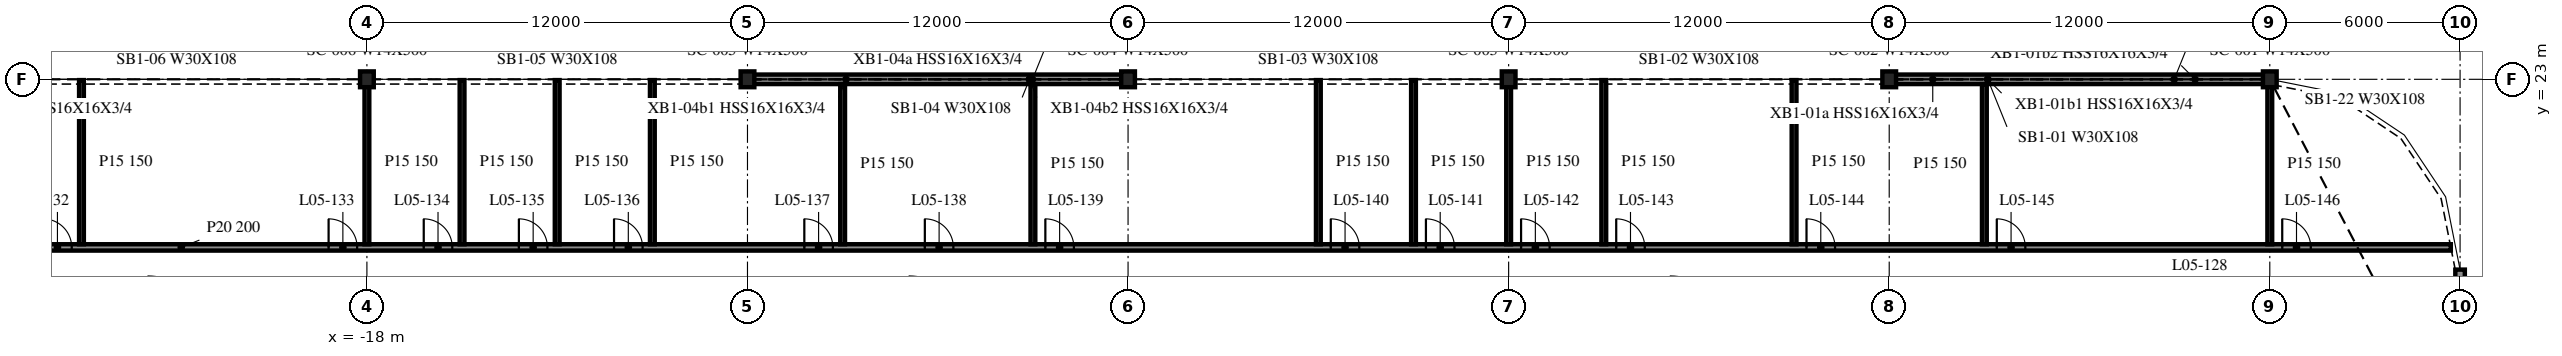
"""IFC4 building model, lengths in metres.
Left out: names, types, materials, properties, quantities, classifications, styles, units other than length and angle.
Written with IfcOpenShell. Run it as: python <this file> out.ifc"""

import sys

from ifc_helpers import new_model, si_unit, direction, frame, frame_2d, origin, origin_2d, place, context, subcontext, project, spatial, rectangle, i_section, extrude, element, fill, save


model = new_model("IFC4")
c1 = context("Model", 3, precision=1e-05, world=origin(), true_north=direction((0.0, 1.0)))
c2 = subcontext(c1, "Body", "Model", "MODEL_VIEW")
j1 = project(units=[si_unit("LENGTHUNIT", "METRE"), si_unit("PLANEANGLEUNIT", "RADIAN")], contexts=[c1])
p1 = place(None, origin())
s1 = spatial("IfcSite", under=j1, at=p1, CompositionType="ELEMENT")
p2 = place(p1, origin())
s2 = spatial("IfcBuilding", under=s1, at=p2, CompositionType="ELEMENT")
p3 = place(p2, frame((0.0, 0.0, 24.4)))
s3 = spatial("IfcBuildingStorey", under=s2, at=p3, CompositionType="ELEMENT", Elevation=24.4)
for number, where, z_axis, x_axis in (
    (1, (42.0, 23.0, -0.34), (0.0, 0.0, 1.0), (1.0, 0.0, 0.0)),
    (2, (30.0, 23.0, -0.34), (0.0, 0.0, 1.0), (1.0, 0.0, 0.0)),
    (3, (18.0, 23.0, -0.34), (0.0, 0.0, 1.0), (1.0, 0.0, 0.0)),
    (4, (6.0, 23.0, -0.34), (0.0, 0.0, 1.0), (1.0, 0.0, 0.0)),
    (5, (-6.0, 23.0, -0.34), (0.0, 0.0, 1.0), (1.0, 0.0, 0.0)),
    (6, (-18.0, 23.0, -0.34), (0.0, 0.0, 1.0), (1.0, 0.0, 0.0)),
):
    element("IfcColumn", number, at=place(p3, frame(where, z_axis=z_axis, x_axis=x_axis)), inside=s3, PredefinedType="COLUMN", context=c2, shape_type="SweptSolid", body=[
        extrude(i_section(OverallWidth=0.432, OverallDepth=0.498, WebThickness=0.056, FlangeThickness=0.089, at=origin_2d()), origin(), (0.0, 0.0, 1.0), 4.3),
    ])
for number, where, z_axis, x_axis in (
    (7, (41.972, 23.0, 0.0), (0.0, 0.0, 1.0), (-1.0, 0.0, 0.0)),
    (8, (5.972, 23.0, 0.0), (0.0, 0.0, 1.0), (-1.0, 0.0, 0.0)),
):
    element("IfcWall", number, at=place(p3, frame(where, z_axis=z_axis, x_axis=x_axis)), inside=s3, PredefinedType="NOTDEFINED", context=c2, shape_type="SweptSolid", body=[
        extrude(rectangle(XDim=11.944, YDim=0.3, at=frame_2d((5.972, 0.0))), origin(), (0.0, 0.0, 1.0), 3.203),
    ])
p4 = place(p3, frame((48.0, 11.749, 0.0), z_axis=(0.0, 0.0, 1.0), x_axis=(0.0, 1.0, 0.0)))
e9 = element("IfcWall", 9, at=p4, inside=s3, PredefinedType="NOTDEFINED", context=c2, shape_type="SweptSolid", body=[
    extrude(rectangle(XDim=5.251, YDim=0.3, at=frame_2d((2.625, 0.0))), origin(), (0.0, 0.0, 1.0), 3.203),
])
p5 = place(p3, frame((-47.708, 17.7, 0.0), z_axis=(0.0, 0.0, 1.0), x_axis=(1.0, 0.0, 0.0)))
e10 = element("IfcWall", 10, at=p5, inside=s3, PredefinedType="PARTITIONING", context=c2, shape_type="SweptSolid", body=[
    extrude(rectangle(XDim=95.416, YDim=0.2, at=frame_2d((47.708, 0.0))), origin(), (0.0, 0.0, 1.0), 3.96),
])
p6 = place(p5, frame((4.5, 0.0, 0.0)))
e11 = element("IfcOpeningElement", 11, at=p6, cuts=e10, PredefinedType="OPENING", context=c2, shape_type="SweptSolid", body=[
    extrude(rectangle(XDim=0.9, YDim=2.1, at=frame_2d((0.45, 1.05))), frame((0.0, 0.11, 0.0), z_axis=(0.0, -1.0, 0.0), x_axis=(1.0, 0.0, 0.0)), (0.0, 0.0, 1.0), 0.22),
])
p7 = place(p5, frame((7.5, 0.0, 0.0)))
e12 = element("IfcOpeningElement", 12, at=p7, cuts=e10, PredefinedType="OPENING", context=c2, shape_type="SweptSolid", body=[
    extrude(rectangle(XDim=0.9, YDim=2.1, at=frame_2d((0.45, 1.05))), frame((0.0, 0.11, 0.0), z_axis=(0.0, -1.0, 0.0), x_axis=(1.0, 0.0, 0.0)), (0.0, 0.0, 1.0), 0.22),
])
p8 = place(p5, frame((13.5, 0.0, 0.0)))
e13 = element("IfcOpeningElement", 13, at=p8, cuts=e10, PredefinedType="OPENING", context=c2, shape_type="SweptSolid", body=[
    extrude(rectangle(XDim=0.9, YDim=2.1, at=frame_2d((0.45, 1.05))), frame((0.0, 0.11, 0.0), z_axis=(0.0, -1.0, 0.0), x_axis=(1.0, 0.0, 0.0)), (0.0, 0.0, 1.0), 0.22),
])
p9 = place(p5, frame((19.5, 0.0, 0.0)))
e14 = element("IfcOpeningElement", 14, at=p9, cuts=e10, PredefinedType="OPENING", context=c2, shape_type="SweptSolid", body=[
    extrude(rectangle(XDim=0.9, YDim=2.1, at=frame_2d((0.45, 1.05))), frame((0.0, 0.11, 0.0), z_axis=(0.0, -1.0, 0.0), x_axis=(1.0, 0.0, 0.0)), (0.0, 0.0, 1.0), 0.22),
])
p10 = place(p5, frame((28.5, 0.0, 0.0)))
e15 = element("IfcOpeningElement", 15, at=p10, cuts=e10, PredefinedType="OPENING", context=c2, shape_type="SweptSolid", body=[
    extrude(rectangle(XDim=0.9, YDim=2.1, at=frame_2d((0.45, 1.05))), frame((0.0, 0.11, 0.0), z_axis=(0.0, -1.0, 0.0), x_axis=(1.0, 0.0, 0.0)), (0.0, 0.0, 1.0), 0.22),
])
p11 = place(p5, frame((31.5, 0.0, 0.0)))
e16 = element("IfcOpeningElement", 16, at=p11, cuts=e10, PredefinedType="OPENING", context=c2, shape_type="SweptSolid", body=[
    extrude(rectangle(XDim=0.9, YDim=2.1, at=frame_2d((0.45, 1.05))), frame((0.0, 0.11, 0.0), z_axis=(0.0, -1.0, 0.0), x_axis=(1.0, 0.0, 0.0)), (0.0, 0.0, 1.0), 0.22),
])
p12 = place(p5, frame((34.5, 0.0, 0.0)))
e17 = element("IfcOpeningElement", 17, at=p12, cuts=e10, PredefinedType="OPENING", context=c2, shape_type="SweptSolid", body=[
    extrude(rectangle(XDim=0.9, YDim=2.1, at=frame_2d((0.45, 1.05))), frame((0.0, 0.11, 0.0), z_axis=(0.0, -1.0, 0.0), x_axis=(1.0, 0.0, 0.0)), (0.0, 0.0, 1.0), 0.22),
])
p13 = place(p5, frame((37.5, 0.0, 0.0)))
e18 = element("IfcOpeningElement", 18, at=p13, cuts=e10, PredefinedType="OPENING", context=c2, shape_type="SweptSolid", body=[
    extrude(rectangle(XDim=0.9, YDim=2.1, at=frame_2d((0.45, 1.05))), frame((0.0, 0.11, 0.0), z_axis=(0.0, -1.0, 0.0), x_axis=(1.0, 0.0, 0.0)), (0.0, 0.0, 1.0), 0.22),
])
p14 = place(p5, frame((43.5, 0.0, 0.0)))
e19 = element("IfcOpeningElement", 19, at=p14, cuts=e10, PredefinedType="OPENING", context=c2, shape_type="SweptSolid", body=[
    extrude(rectangle(XDim=0.9, YDim=2.1, at=frame_2d((0.45, 1.05))), frame((0.0, 0.11, 0.0), z_axis=(0.0, -1.0, 0.0), x_axis=(1.0, 0.0, 0.0)), (0.0, 0.0, 1.0), 0.22),
])
p15 = place(p5, frame((47.3, 0.0, 0.0)))
e20 = element("IfcOpeningElement", 20, at=p15, cuts=e10, PredefinedType="OPENING", context=c2, shape_type="SweptSolid", body=[
    extrude(rectangle(XDim=0.9, YDim=2.1, at=frame_2d((0.45, 1.05))), frame((0.0, 0.11, 0.0), z_axis=(0.0, -1.0, 0.0), x_axis=(1.0, 0.0, 0.0)), (0.0, 0.0, 1.0), 0.22),
])
p16 = place(p5, frame((51.1, 0.0, 0.0)))
e21 = element("IfcOpeningElement", 21, at=p16, cuts=e10, PredefinedType="OPENING", context=c2, shape_type="SweptSolid", body=[
    extrude(rectangle(XDim=0.9, YDim=2.1, at=frame_2d((0.45, 1.05))), frame((0.0, 0.11, 0.0), z_axis=(0.0, -1.0, 0.0), x_axis=(1.0, 0.0, 0.0)), (0.0, 0.0, 1.0), 0.22),
])
p17 = place(p5, frame((60.1, 0.0, 0.0)))
e22 = element("IfcOpeningElement", 22, at=p17, cuts=e10, PredefinedType="OPENING", context=c2, shape_type="SweptSolid", body=[
    extrude(rectangle(XDim=0.9, YDim=2.1, at=frame_2d((0.45, 1.05))), frame((0.0, 0.11, 0.0), z_axis=(0.0, -1.0, 0.0), x_axis=(1.0, 0.0, 0.0)), (0.0, 0.0, 1.0), 0.22),
])
p18 = place(p5, frame((63.1, 0.0, 0.0)))
e23 = element("IfcOpeningElement", 23, at=p18, cuts=e10, PredefinedType="OPENING", context=c2, shape_type="SweptSolid", body=[
    extrude(rectangle(XDim=0.9, YDim=2.1, at=frame_2d((0.45, 1.05))), frame((0.0, 0.11, 0.0), z_axis=(0.0, -1.0, 0.0), x_axis=(1.0, 0.0, 0.0)), (0.0, 0.0, 1.0), 0.22),
])
p19 = place(p5, frame((66.1, 0.0, 0.0)))
e24 = element("IfcOpeningElement", 24, at=p19, cuts=e10, PredefinedType="OPENING", context=c2, shape_type="SweptSolid", body=[
    extrude(rectangle(XDim=0.9, YDim=2.1, at=frame_2d((0.45, 1.05))), frame((0.0, 0.11, 0.0), z_axis=(0.0, -1.0, 0.0), x_axis=(1.0, 0.0, 0.0)), (0.0, 0.0, 1.0), 0.22),
])
p20 = place(p5, frame((69.1, 0.0, 0.0)))
e25 = element("IfcOpeningElement", 25, at=p20, cuts=e10, PredefinedType="OPENING", context=c2, shape_type="SweptSolid", body=[
    extrude(rectangle(XDim=0.9, YDim=2.1, at=frame_2d((0.45, 1.05))), frame((0.0, 0.11, 0.0), z_axis=(0.0, -1.0, 0.0), x_axis=(1.0, 0.0, 0.0)), (0.0, 0.0, 1.0), 0.22),
])
p21 = place(p5, frame((75.1, 0.0, 0.0)))
e26 = element("IfcOpeningElement", 26, at=p21, cuts=e10, PredefinedType="OPENING", context=c2, shape_type="SweptSolid", body=[
    extrude(rectangle(XDim=0.9, YDim=2.1, at=frame_2d((0.45, 1.05))), frame((0.0, 0.11, 0.0), z_axis=(0.0, -1.0, 0.0), x_axis=(1.0, 0.0, 0.0)), (0.0, 0.0, 1.0), 0.22),
])
p22 = place(p5, frame((81.1, 0.0, 0.0)))
e27 = element("IfcOpeningElement", 27, at=p22, cuts=e10, PredefinedType="OPENING", context=c2, shape_type="SweptSolid", body=[
    extrude(rectangle(XDim=0.9, YDim=2.1, at=frame_2d((0.45, 1.05))), frame((0.0, 0.11, 0.0), z_axis=(0.0, -1.0, 0.0), x_axis=(1.0, 0.0, 0.0)), (0.0, 0.0, 1.0), 0.22),
])
p23 = place(p5, frame((90.1, 0.0, 0.0)))
e28 = element("IfcOpeningElement", 28, at=p23, cuts=e10, PredefinedType="OPENING", context=c2, shape_type="SweptSolid", body=[
    extrude(rectangle(XDim=0.9, YDim=2.1, at=frame_2d((0.45, 1.05))), frame((0.0, 0.11, 0.0), z_axis=(0.0, -1.0, 0.0), x_axis=(1.0, 0.0, 0.0)), (0.0, 0.0, 1.0), 0.22),
])
for number, where, z_axis, x_axis in (
    (29, (-27.0, 17.8, 0.0), (0.0, 0.0, 1.0), (0.0, 1.0, 0.0)),
    (30, (-18.0, 17.8, 0.0), (0.0, 0.0, 1.0), (0.0, 1.0, 0.0)),
    (31, (-15.0, 17.8, 0.0), (0.0, 0.0, 1.0), (0.0, 1.0, 0.0)),
    (32, (-12.0, 17.8, 0.0), (0.0, 0.0, 1.0), (0.0, 1.0, 0.0)),
    (33, (-9.0, 17.8, 0.0), (0.0, 0.0, 1.0), (0.0, 1.0, 0.0)),
):
    element("IfcWall", number, at=place(p3, frame(where, z_axis=z_axis, x_axis=x_axis)), inside=s3, PredefinedType="PARTITIONING", context=c2, shape_type="SweptSolid", body=[
        extrude(rectangle(XDim=5.175, YDim=0.15, at=frame_2d((2.587, 0.0))), origin(), (0.0, 0.0, 1.0), 3.96),
    ])
for number, where, z_axis, x_axis in (
    (34, (-3.0, 17.8, 0.0), (0.0, 0.0, 1.0), (0.0, 1.0, 0.0)),
    (35, (3.0, 17.8, 0.0), (0.0, 0.0, 1.0), (0.0, 1.0, 0.0)),
):
    element("IfcWall", number, at=place(p3, frame(where, z_axis=z_axis, x_axis=x_axis)), inside=s3, PredefinedType="PARTITIONING", context=c2, shape_type="SweptSolid", body=[
        extrude(rectangle(XDim=5.05, YDim=0.15, at=frame_2d((2.525, 0.0))), origin(), (0.0, 0.0, 1.0), 3.96),
    ])
for number, where, z_axis, x_axis in (
    (36, (12.0, 17.8, 0.0), (0.0, 0.0, 1.0), (0.0, 1.0, 0.0)),
    (37, (15.0, 17.8, 0.0), (0.0, 0.0, 1.0), (0.0, 1.0, 0.0)),
    (38, (18.0, 17.8, 0.0), (0.0, 0.0, 1.0), (0.0, 1.0, 0.0)),
    (39, (21.0, 17.8, 0.0), (0.0, 0.0, 1.0), (0.0, 1.0, 0.0)),
    (40, (27.0, 17.8, 0.0), (0.0, 0.0, 1.0), (0.0, 1.0, 0.0)),
):
    element("IfcWall", number, at=place(p3, frame(where, z_axis=z_axis, x_axis=x_axis)), inside=s3, PredefinedType="PARTITIONING", context=c2, shape_type="SweptSolid", body=[
        extrude(rectangle(XDim=5.175, YDim=0.15, at=frame_2d((2.587, 0.0))), origin(), (0.0, 0.0, 1.0), 3.96),
    ])
p24 = place(p3, frame((33.0, 17.8, 0.0), z_axis=(0.0, 0.0, 1.0), x_axis=(0.0, 1.0, 0.0)))
e41 = element("IfcWall", 41, at=p24, inside=s3, PredefinedType="PARTITIONING", context=c2, shape_type="SweptSolid", body=[
    extrude(rectangle(XDim=5.05, YDim=0.15, at=frame_2d((2.525, 0.0))), origin(), (0.0, 0.0, 1.0), 3.96),
])
p25 = place(p3, frame((42.0, 17.8, 0.0), z_axis=(0.0, 0.0, 1.0), x_axis=(0.0, 1.0, 0.0)))
e42 = element("IfcWall", 42, at=p25, inside=s3, PredefinedType="PARTITIONING", context=c2, shape_type="SweptSolid", body=[
    extrude(rectangle(XDim=5.047, YDim=0.15, at=frame_2d((2.523, 0.0))), origin(), (0.0, 0.0, 1.0), 3.96),
])
p26 = place(p9, origin())
e43 = element("IfcDoor", 43, at=p26, inside=s3, OperationType="SINGLE_SWING_LEFT", PredefinedType="DOOR", context=c2, shape_type="SweptSolid", body=[
    extrude(rectangle(XDim=0.9, YDim=2.1, at=frame_2d((0.45, 1.05))), frame((0.0, 0.025, 0.0), z_axis=(0.0, -1.0, 0.0), x_axis=(1.0, 0.0, 0.0)), (0.0, 0.0, 1.0), 0.05),
])
fill(e14, e43)
p27 = place(p10, origin())
e44 = element("IfcDoor", 44, at=p27, inside=s3, OperationType="SINGLE_SWING_LEFT", PredefinedType="DOOR", context=c2, shape_type="SweptSolid", body=[
    extrude(rectangle(XDim=0.9, YDim=2.1, at=frame_2d((0.45, 1.05))), frame((0.0, 0.025, 0.0), z_axis=(0.0, -1.0, 0.0), x_axis=(1.0, 0.0, 0.0)), (0.0, 0.0, 1.0), 0.05),
])
fill(e15, e44)
p28 = place(p11, origin())
e45 = element("IfcDoor", 45, at=p28, inside=s3, OperationType="SINGLE_SWING_LEFT", PredefinedType="DOOR", context=c2, shape_type="SweptSolid", body=[
    extrude(rectangle(XDim=0.9, YDim=2.1, at=frame_2d((0.45, 1.05))), frame((0.0, 0.025, 0.0), z_axis=(0.0, -1.0, 0.0), x_axis=(1.0, 0.0, 0.0)), (0.0, 0.0, 1.0), 0.05),
])
fill(e16, e45)
p29 = place(p12, origin())
e46 = element("IfcDoor", 46, at=p29, inside=s3, OperationType="SINGLE_SWING_LEFT", PredefinedType="DOOR", context=c2, shape_type="SweptSolid", body=[
    extrude(rectangle(XDim=0.9, YDim=2.1, at=frame_2d((0.45, 1.05))), frame((0.0, 0.025, 0.0), z_axis=(0.0, -1.0, 0.0), x_axis=(1.0, 0.0, 0.0)), (0.0, 0.0, 1.0), 0.05),
])
fill(e17, e46)
p30 = place(p13, origin())
e47 = element("IfcDoor", 47, at=p30, inside=s3, OperationType="SINGLE_SWING_LEFT", PredefinedType="DOOR", context=c2, shape_type="SweptSolid", body=[
    extrude(rectangle(XDim=0.9, YDim=2.1, at=frame_2d((0.45, 1.05))), frame((0.0, 0.025, 0.0), z_axis=(0.0, -1.0, 0.0), x_axis=(1.0, 0.0, 0.0)), (0.0, 0.0, 1.0), 0.05),
])
fill(e18, e47)
p31 = place(p14, origin())
e48 = element("IfcDoor", 48, at=p31, inside=s3, OperationType="SINGLE_SWING_LEFT", PredefinedType="DOOR", context=c2, shape_type="SweptSolid", body=[
    extrude(rectangle(XDim=0.9, YDim=2.1, at=frame_2d((0.45, 1.05))), frame((0.0, 0.025, 0.0), z_axis=(0.0, -1.0, 0.0), x_axis=(1.0, 0.0, 0.0)), (0.0, 0.0, 1.0), 0.05),
])
fill(e19, e48)
p32 = place(p15, origin())
e49 = element("IfcDoor", 49, at=p32, inside=s3, OperationType="SINGLE_SWING_RIGHT", PredefinedType="DOOR", context=c2, shape_type="SweptSolid", body=[
    extrude(rectangle(XDim=0.9, YDim=2.1, at=frame_2d((0.45, 1.05))), frame((0.0, 0.025, 0.0), z_axis=(0.0, -1.0, 0.0), x_axis=(1.0, 0.0, 0.0)), (0.0, 0.0, 1.0), 0.05),
])
fill(e20, e49)
p33 = place(p16, origin())
e50 = element("IfcDoor", 50, at=p33, inside=s3, OperationType="SINGLE_SWING_RIGHT", PredefinedType="DOOR", context=c2, shape_type="SweptSolid", body=[
    extrude(rectangle(XDim=0.9, YDim=2.1, at=frame_2d((0.45, 1.05))), frame((0.0, 0.025, 0.0), z_axis=(0.0, -1.0, 0.0), x_axis=(1.0, 0.0, 0.0)), (0.0, 0.0, 1.0), 0.05),
])
fill(e21, e50)
p34 = place(p17, origin())
e51 = element("IfcDoor", 51, at=p34, inside=s3, OperationType="SINGLE_SWING_RIGHT", PredefinedType="DOOR", context=c2, shape_type="SweptSolid", body=[
    extrude(rectangle(XDim=0.9, YDim=2.1, at=frame_2d((0.45, 1.05))), frame((0.0, 0.025, 0.0), z_axis=(0.0, -1.0, 0.0), x_axis=(1.0, 0.0, 0.0)), (0.0, 0.0, 1.0), 0.05),
])
fill(e22, e51)
p35 = place(p18, origin())
e52 = element("IfcDoor", 52, at=p35, inside=s3, OperationType="SINGLE_SWING_RIGHT", PredefinedType="DOOR", context=c2, shape_type="SweptSolid", body=[
    extrude(rectangle(XDim=0.9, YDim=2.1, at=frame_2d((0.45, 1.05))), frame((0.0, 0.025, 0.0), z_axis=(0.0, -1.0, 0.0), x_axis=(1.0, 0.0, 0.0)), (0.0, 0.0, 1.0), 0.05),
])
fill(e23, e52)
p36 = place(p19, origin())
e53 = element("IfcDoor", 53, at=p36, inside=s3, OperationType="SINGLE_SWING_RIGHT", PredefinedType="DOOR", context=c2, shape_type="SweptSolid", body=[
    extrude(rectangle(XDim=0.9, YDim=2.1, at=frame_2d((0.45, 1.05))), frame((0.0, 0.025, 0.0), z_axis=(0.0, -1.0, 0.0), x_axis=(1.0, 0.0, 0.0)), (0.0, 0.0, 1.0), 0.05),
])
fill(e24, e53)
p37 = place(p20, origin())
e54 = element("IfcDoor", 54, at=p37, inside=s3, OperationType="SINGLE_SWING_RIGHT", PredefinedType="DOOR", context=c2, shape_type="SweptSolid", body=[
    extrude(rectangle(XDim=0.9, YDim=2.1, at=frame_2d((0.45, 1.05))), frame((0.0, 0.025, 0.0), z_axis=(0.0, -1.0, 0.0), x_axis=(1.0, 0.0, 0.0)), (0.0, 0.0, 1.0), 0.05),
])
fill(e25, e54)
p38 = place(p21, origin())
e55 = element("IfcDoor", 55, at=p38, inside=s3, OperationType="SINGLE_SWING_RIGHT", PredefinedType="DOOR", context=c2, shape_type="SweptSolid", body=[
    extrude(rectangle(XDim=0.9, YDim=2.1, at=frame_2d((0.45, 1.05))), frame((0.0, 0.025, 0.0), z_axis=(0.0, -1.0, 0.0), x_axis=(1.0, 0.0, 0.0)), (0.0, 0.0, 1.0), 0.05),
])
fill(e26, e55)
p39 = place(p22, origin())
e56 = element("IfcDoor", 56, at=p39, inside=s3, OperationType="SINGLE_SWING_RIGHT", PredefinedType="DOOR", context=c2, shape_type="SweptSolid", body=[
    extrude(rectangle(XDim=0.9, YDim=2.1, at=frame_2d((0.45, 1.05))), frame((0.0, 0.025, 0.0), z_axis=(0.0, -1.0, 0.0), x_axis=(1.0, 0.0, 0.0)), (0.0, 0.0, 1.0), 0.05),
])
fill(e27, e56)
p40 = place(p23, origin())
e57 = element("IfcDoor", 57, at=p40, inside=s3, OperationType="SINGLE_SWING_RIGHT", PredefinedType="DOOR", context=c2, shape_type="SweptSolid", body=[
    extrude(rectangle(XDim=0.9, YDim=2.1, at=frame_2d((0.45, 1.05))), frame((0.0, 0.025, 0.0), z_axis=(0.0, -1.0, 0.0), x_axis=(1.0, 0.0, 0.0)), (0.0, 0.0, 1.0), 0.05),
])
fill(e28, e57)
save(model, sys.argv[1])
